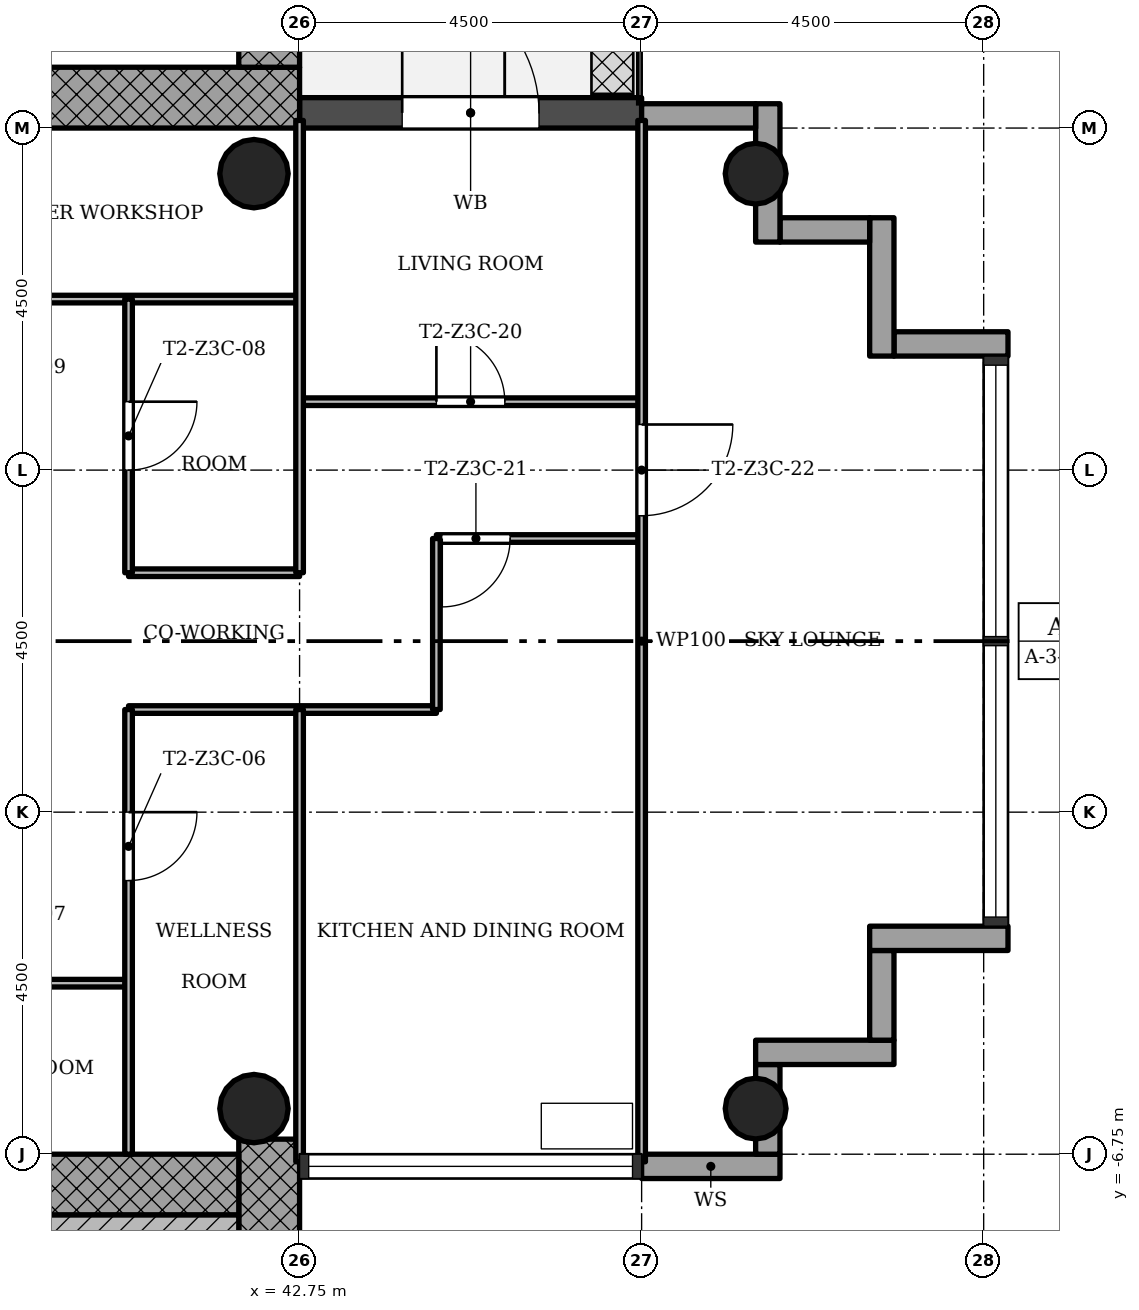
"""IFC4 building model, lengths in metres.
Left out: names, types, materials, properties, quantities, classifications, styles, units other than length and angle.
Written with IfcOpenShell. Run it as: python <this file> out.ifc"""

import sys

from ifc_helpers import new_model, si_unit, direction, frame, frame_2d, origin, origin_2d, place, context, subcontext, project, spatial, rectangle, hollow_circle, extrude, element, fill, save


model = new_model("IFC4")
c1 = context("Model", 3, precision=1e-05, world=origin(), true_north=direction((0.0, 1.0)))
c2 = subcontext(c1, "Body", "Model", "MODEL_VIEW")
j1 = project(units=[si_unit("LENGTHUNIT", "METRE"), si_unit("PLANEANGLEUNIT", "RADIAN")], contexts=[c1])
p1 = place(None, origin())
s1 = spatial("IfcSite", under=j1, at=p1, CompositionType="ELEMENT")
p2 = place(p1, origin())
s2 = spatial("IfcBuilding", under=s1, at=p2, CompositionType="ELEMENT")
p3 = place(p2, frame((0.0, 0.0, 160.9)))
s3 = spatial("IfcBuildingStorey", under=s2, at=p3, CompositionType="ELEMENT", Elevation=160.9)
p4 = place(p3, frame((30.05, 7.15, 0.0), z_axis=(0.0, 0.0, 1.0), x_axis=(1.0, 0.0, 0.0)))
e1 = element("IfcWall", 1, at=p4, inside=s3, PredefinedType="SHEAR", context=c2, shape_type="SweptSolid", body=[
    extrude(rectangle(XDim=12.7, YDim=0.8, at=frame_2d((6.35, 0.0))), origin(), (0.0, 0.0, 1.0), 3.4),
])
p5 = place(p4, frame((5.05, 0.0, 0.0)))
e2 = element("IfcOpeningElement", 2, at=p5, cuts=e1, PredefinedType="OPENING", context=c2, shape_type="SweptSolid", body=[
    extrude(rectangle(XDim=1.8, YDim=2.1, at=frame_2d((0.9, 1.05))), frame((0.0, 0.41, 0.0), z_axis=(0.0, -1.0, 0.0), x_axis=(1.0, 0.0, 0.0)), (0.0, 0.0, 1.0), 0.82),
])
p6 = place(p3, frame((42.35, 7.55, 0.0), z_axis=(0.0, 0.0, 1.0), x_axis=(0.0, 1.0, 0.0)))
e3 = element("IfcWall", 3, at=p6, inside=s3, PredefinedType="SHEAR", context=c2, shape_type="SweptSolid", body=[
    extrude(rectangle(XDim=8.2, YDim=0.8, at=frame_2d((4.1, 0.0))), origin(), (0.0, 0.0, 1.0), 3.4),
])
p7 = place(p3, frame((42.35, -14.95, 0.0), z_axis=(0.0, 0.0, 1.0), x_axis=(0.0, 1.0, 0.0)))
e4 = element("IfcWall", 4, at=p7, inside=s3, PredefinedType="SHEAR", context=c2, shape_type="SweptSolid", body=[
    extrude(rectangle(XDim=8.398, YDim=0.8, at=frame_2d((4.199, 0.0))), origin(), (0.0, 0.0, 1.0), 3.4),
])
p8 = place(p3, frame((41.95, -7.15, 0.0), z_axis=(0.0, 0.0, 1.0), x_axis=(-1.0, 0.0, 0.0)))
e5 = element("IfcWall", 5, at=p8, inside=s3, PredefinedType="SHEAR", context=c2, shape_type="SweptSolid", body=[
    extrude(rectangle(XDim=12.7, YDim=0.8, at=frame_2d((6.35, 0.0))), origin(), (0.0, 0.0, 1.0), 3.4),
])
p9 = place(p8, frame((5.05, 0.0, 0.0)))
e6 = element("IfcOpeningElement", 6, at=p9, cuts=e5, PredefinedType="OPENING", context=c2, shape_type="SweptSolid", body=[
    extrude(rectangle(XDim=1.8, YDim=2.1, at=frame_2d((0.9, 1.05))), frame((0.0, 0.41, 0.0), z_axis=(0.0, -1.0, 0.0), x_axis=(1.0, 0.0, 0.0)), (0.0, 0.0, 1.0), 0.82),
])
for number, where, z_axis, x_axis in (
    (7, (48.75, -6.15, 0.0), (0.0, 0.0, 1.0), (1.0, 0.0, 0.0)),
    (8, (48.75, 6.15, 0.0), (0.0, 0.0, 1.0), (1.0, 0.0, 0.0)),
):
    element("IfcColumn", number, at=place(p3, frame(where, z_axis=z_axis, x_axis=x_axis)), inside=s3, PredefinedType="COLUMN", context=c2, shape_type="SweptSolid", body=[
        extrude(hollow_circle(Radius=0.4, WallThickness=0.028, at=origin_2d()), origin(), (0.0, 0.0, 1.0), 3.4),
    ])
for number, where, z_axis, x_axis in (
    (9, (42.15, -6.15, 0.0), (0.0, 0.0, 1.0), (1.0, 0.0, 0.0)),
    (10, (42.15, 6.15, 0.0), (0.0, 0.0, 1.0), (1.0, 0.0, 0.0)),
):
    element("IfcColumn", number, at=place(p3, frame(where, z_axis=z_axis, x_axis=x_axis)), inside=s3, PredefinedType="COLUMN", context=c2, shape_type="SweptSolid", body=[
        extrude(hollow_circle(Radius=0.45, WallThickness=0.032, at=origin_2d()), origin(), (0.0, 0.0, 1.0), 3.4),
    ])
p10 = place(p3, frame((47.25, -6.91, -0.3), z_axis=(0.0, 0.0, 1.0), x_axis=(1.0, 0.0, 0.0)))
e11 = element("IfcWall", 11, at=p10, inside=s3, PredefinedType="STANDARD", context=c2, shape_type="SweptSolid", body=[
    extrude(rectangle(XDim=1.82, YDim=0.32, at=frame_2d((0.91, 0.0))), origin(), (0.0, 0.0, 1.0), 3.4),
])
p11 = place(p3, frame((48.91, -6.75, -0.3), z_axis=(0.0, 0.0, 1.0), x_axis=(0.0, 1.0, 0.0)))
e12 = element("IfcWall", 12, at=p11, inside=s3, PredefinedType="STANDARD", context=c2, shape_type="SweptSolid", body=[
    extrude(rectangle(XDim=1.18, YDim=0.32, at=frame_2d((0.59, 0.0))), origin(), (0.0, 0.0, 1.0), 3.4),
])
p12 = place(p3, frame((48.75, -5.41, -0.3), z_axis=(0.0, 0.0, 1.0), x_axis=(1.0, 0.0, 0.0)))
e13 = element("IfcWall", 13, at=p12, inside=s3, PredefinedType="STANDARD", context=c2, shape_type="SweptSolid", body=[
    extrude(rectangle(XDim=1.82, YDim=0.32, at=frame_2d((0.91, 0.0))), origin(), (0.0, 0.0, 1.0), 3.4),
])
p13 = place(p3, frame((50.41, -5.25, -0.3), z_axis=(0.0, 0.0, 1.0), x_axis=(0.0, 1.0, 0.0)))
e14 = element("IfcWall", 14, at=p13, inside=s3, PredefinedType="STANDARD", context=c2, shape_type="SweptSolid", body=[
    extrude(rectangle(XDim=1.18, YDim=0.32, at=frame_2d((0.59, 0.0))), origin(), (0.0, 0.0, 1.0), 3.4),
])
p14 = place(p3, frame((50.25, -3.91, -0.3), z_axis=(0.0, 0.0, 1.0), x_axis=(1.0, 0.0, 0.0)))
e15 = element("IfcWall", 15, at=p14, inside=s3, PredefinedType="STANDARD", context=c2, shape_type="SweptSolid", body=[
    extrude(rectangle(XDim=1.82, YDim=0.32, at=frame_2d((0.91, 0.0))), origin(), (0.0, 0.0, 1.0), 3.4),
])
p15 = place(p3, frame((52.07, 3.91, -0.3), z_axis=(0.0, 0.0, 1.0), x_axis=(-1.0, 0.0, 0.0)))
e16 = element("IfcWall", 16, at=p15, inside=s3, PredefinedType="STANDARD", context=c2, shape_type="SweptSolid", body=[
    extrude(rectangle(XDim=1.5, YDim=0.32, at=frame_2d((0.75, 0.0))), origin(), (0.0, 0.0, 1.0), 3.4),
])
p16 = place(p3, frame((50.41, 3.75, -0.3), z_axis=(0.0, 0.0, 1.0), x_axis=(0.0, 1.0, 0.0)))
e17 = element("IfcWall", 17, at=p16, inside=s3, PredefinedType="STANDARD", context=c2, shape_type="SweptSolid", body=[
    extrude(rectangle(XDim=1.82, YDim=0.32, at=frame_2d((0.91, 0.0))), origin(), (0.0, 0.0, 1.0), 3.4),
])
p17 = place(p3, frame((50.25, 5.41, -0.3), z_axis=(0.0, 0.0, 1.0), x_axis=(-1.0, 0.0, 0.0)))
e18 = element("IfcWall", 18, at=p17, inside=s3, PredefinedType="STANDARD", context=c2, shape_type="SweptSolid", body=[
    extrude(rectangle(XDim=1.18, YDim=0.32, at=frame_2d((0.59, 0.0))), origin(), (0.0, 0.0, 1.0), 3.4),
])
p18 = place(p3, frame((48.91, 5.25, -0.3), z_axis=(0.0, 0.0, 1.0), x_axis=(0.0, 1.0, 0.0)))
e19 = element("IfcWall", 19, at=p18, inside=s3, PredefinedType="STANDARD", context=c2, shape_type="SweptSolid", body=[
    extrude(rectangle(XDim=1.82, YDim=0.32, at=frame_2d((0.91, 0.0))), origin(), (0.0, 0.0, 1.0), 3.4),
])
p19 = place(p3, frame((48.75, 6.91, -0.3), z_axis=(0.0, 0.0, 1.0), x_axis=(-1.0, 0.0, 0.0)))
e20 = element("IfcWall", 20, at=p19, inside=s3, PredefinedType="STANDARD", context=c2, shape_type="SweptSolid", body=[
    extrude(rectangle(XDim=1.5, YDim=0.32, at=frame_2d((0.75, 0.0))), origin(), (0.0, 0.0, 1.0), 3.4),
])
p20 = place(p3, frame((47.25, 6.95, -0.02), z_axis=(0.0, 0.0, 1.0), x_axis=(-1.0, 0.0, 0.0)))
e21 = element("IfcWall", 21, at=p20, inside=s3, PredefinedType="STANDARD", context=c2, shape_type="SweptSolid", body=[
    extrude(rectangle(XDim=4.5, YDim=0.4, at=frame_2d((2.25, 0.0))), origin(), (0.0, 0.0, 1.0), 3.12),
])
p21 = place(p20, frame((1.35, 0.0, 0.02)))
e22 = element("IfcOpeningElement", 22, at=p21, cuts=e21, PredefinedType="OPENING", context=c2, shape_type="SweptSolid", body=[
    extrude(rectangle(XDim=1.8, YDim=2.1, at=frame_2d((0.9, 1.05))), frame((0.0, 0.21, 0.0), z_axis=(0.0, -1.0, 0.0), x_axis=(1.0, 0.0, 0.0)), (0.0, 0.0, 1.0), 0.42),
])
p22 = place(p3, frame((40.5, -4.5, 0.0), z_axis=(0.0, 0.0, 1.0), x_axis=(-1.0, 0.0, 0.0)))
e23 = element("IfcWall", 23, at=p22, inside=s3, PredefinedType="PARTITIONING", context=c2, shape_type="SweptSolid", body=[
    extrude(rectangle(XDim=3.0, YDim=0.1, at=frame_2d((1.5, 0.0))), origin(), (0.0, 0.0, 1.0), 3.0),
])
p23 = place(p22, frame((1.05, 0.0, 0.0)))
e24 = element("IfcOpeningElement", 24, at=p23, cuts=e23, PredefinedType="OPENING", context=c2, shape_type="SweptSolid", body=[
    extrude(rectangle(XDim=0.9, YDim=2.1, at=frame_2d((0.45, 1.05))), frame((0.0, 0.06, 0.0), z_axis=(0.0, -1.0, 0.0), x_axis=(1.0, 0.0, 0.0)), (0.0, 0.0, 1.0), 0.12),
])
p24 = place(p3, frame((44.55, -0.9, 0.0), z_axis=(0.0, 0.0, 1.0), x_axis=(-1.0, 0.0, 0.0)))
e25 = element("IfcWall", 25, at=p24, inside=s3, PredefinedType="PARTITIONING", context=c2, shape_type="SweptSolid", body=[
    extrude(rectangle(XDim=4.05, YDim=0.1, at=frame_2d((2.025, 0.0))), origin(), (0.0, 0.0, 1.0), 3.0),
])
p25 = place(p3, frame((42.75, 0.9, 0.0), z_axis=(0.0, 0.0, 1.0), x_axis=(-1.0, 0.0, 0.0)))
e26 = element("IfcWall", 26, at=p25, inside=s3, PredefinedType="PARTITIONING", context=c2, shape_type="SweptSolid", body=[
    extrude(rectangle(XDim=2.25, YDim=0.1, at=frame_2d((1.125, 0.0))), origin(), (0.0, 0.0, 1.0), 3.0),
])
p26 = place(p3, frame((47.25, 1.35, 0.0), z_axis=(0.0, 0.0, 1.0), x_axis=(-1.0, 0.0, 0.0)))
e27 = element("IfcWall", 27, at=p26, inside=s3, PredefinedType="PARTITIONING", context=c2, shape_type="SweptSolid", body=[
    extrude(rectangle(XDim=2.7, YDim=0.1, at=frame_2d((1.35, 0.0))), origin(), (0.0, 0.0, 1.0), 3.0),
])
p27 = place(p26, frame((1.73, 0.0, 0.0)))
e28 = element("IfcOpeningElement", 28, at=p27, cuts=e27, PredefinedType="OPENING", context=c2, shape_type="SweptSolid", body=[
    extrude(rectangle(XDim=0.9, YDim=2.1, at=frame_2d((0.45, 1.05))), frame((0.0, 0.06, 0.0), z_axis=(0.0, -1.0, 0.0), x_axis=(1.0, 0.0, 0.0)), (0.0, 0.0, 1.0), 0.12),
])
p28 = place(p3, frame((47.25, 3.15, 0.0), z_axis=(0.0, 0.0, 1.0), x_axis=(-1.0, 0.0, 0.0)))
e29 = element("IfcWall", 29, at=p28, inside=s3, PredefinedType="PARTITIONING", context=c2, shape_type="SweptSolid", body=[
    extrude(rectangle(XDim=4.5, YDim=0.1, at=frame_2d((2.25, 0.0))), origin(), (0.0, 0.0, 1.0), 3.0),
])
p29 = place(p28, frame((1.8, 0.0, 0.0)))
e30 = element("IfcOpeningElement", 30, at=p29, cuts=e29, PredefinedType="OPENING", context=c2, shape_type="SweptSolid", body=[
    extrude(rectangle(XDim=0.9, YDim=2.1, at=frame_2d((0.45, 1.05))), frame((0.0, 0.06, 0.0), z_axis=(0.0, -1.0, 0.0), x_axis=(1.0, 0.0, 0.0)), (0.0, 0.0, 1.0), 0.12),
])
p30 = place(p3, frame((42.75, 4.5, 0.0), z_axis=(0.0, 0.0, 1.0), x_axis=(-1.0, 0.0, 0.0)))
e31 = element("IfcWall", 31, at=p30, inside=s3, PredefinedType="PARTITIONING", context=c2, shape_type="SweptSolid", body=[
    extrude(rectangle(XDim=5.25, YDim=0.1, at=frame_2d((2.625, 0.0))), origin(), (0.0, 0.0, 1.0), 3.0),
])
p31 = place(p30, frame((3.3, 0.0, 0.0)))
e32 = element("IfcOpeningElement", 32, at=p31, cuts=e31, PredefinedType="OPENING", context=c2, shape_type="SweptSolid", body=[
    extrude(rectangle(XDim=0.9, YDim=2.1, at=frame_2d((0.45, 1.05))), frame((0.0, 0.06, 0.0), z_axis=(0.0, -1.0, 0.0), x_axis=(1.0, 0.0, 0.0)), (0.0, 0.0, 1.0), 0.12),
])
p32 = place(p3, frame((47.25, -6.85, 0.0), z_axis=(0.0, 0.0, 1.0), x_axis=(0.0, 1.0, 0.0)))
e33 = element("IfcWall", 33, at=p32, inside=s3, PredefinedType="PARTITIONING", context=c2, shape_type="SweptSolid", body=[
    extrude(rectangle(XDim=13.7, YDim=0.1, at=frame_2d((6.85, 0.0))), origin(), (0.0, 0.0, 1.0), 3.0),
])
p33 = place(p32, frame((8.5, 0.0, 0.0)))
e34 = element("IfcOpeningElement", 34, at=p33, cuts=e33, PredefinedType="OPENING", context=c2, shape_type="SweptSolid", body=[
    extrude(rectangle(XDim=1.2, YDim=2.1, at=frame_2d((0.6, 1.05))), frame((0.0, 0.06, 0.0), z_axis=(0.0, -1.0, 0.0), x_axis=(1.0, 0.0, 0.0)), (0.0, 0.0, 1.0), 0.12),
])
p34 = place(p3, frame((44.55, -0.9, 0.0), z_axis=(0.0, 0.0, 1.0), x_axis=(0.0, 1.0, 0.0)))
e35 = element("IfcWall", 35, at=p34, inside=s3, PredefinedType="PARTITIONING", context=c2, shape_type="SweptSolid", body=[
    extrude(rectangle(XDim=2.25, YDim=0.1, at=frame_2d((1.125, 0.0))), origin(), (0.0, 0.0, 1.0), 3.0),
])
for number, where, z_axis, x_axis in (
    (36, (42.75, -6.85, 0.0), (0.0, 0.0, 1.0), (0.0, 1.0, 0.0)),
    (37, (42.75, 0.9, 0.0), (0.0, 0.0, 1.0), (0.0, 1.0, 0.0)),
):
    element("IfcWall", number, at=place(p3, frame(where, z_axis=z_axis, x_axis=x_axis)), inside=s3, PredefinedType="PARTITIONING", context=c2, shape_type="SweptSolid", body=[
        extrude(rectangle(XDim=5.95, YDim=0.1, at=frame_2d((2.975, 0.0))), origin(), (0.0, 0.0, 1.0), 3.0),
    ])
p35 = place(p3, frame((40.5, -6.75, 0.0), z_axis=(0.0, 0.0, 1.0), x_axis=(0.0, 1.0, 0.0)))
e38 = element("IfcWall", 38, at=p35, inside=s3, PredefinedType="PARTITIONING", context=c2, shape_type="SweptSolid", body=[
    extrude(rectangle(XDim=5.85, YDim=0.1, at=frame_2d((2.925, 0.0))), origin(), (0.0, 0.0, 1.0), 3.0),
])
p36 = place(p35, frame((3.6, 0.0, 0.0)))
e39 = element("IfcOpeningElement", 39, at=p36, cuts=e38, PredefinedType="OPENING", context=c2, shape_type="SweptSolid", body=[
    extrude(rectangle(XDim=0.9, YDim=2.1, at=frame_2d((0.45, 1.05))), frame((0.0, 0.06, 0.0), z_axis=(0.0, -1.0, 0.0), x_axis=(1.0, 0.0, 0.0)), (0.0, 0.0, 1.0), 0.12),
])
p37 = place(p3, frame((40.5, 0.9, 0.0), z_axis=(0.0, 0.0, 1.0), x_axis=(0.0, 1.0, 0.0)))
e40 = element("IfcWall", 40, at=p37, inside=s3, PredefinedType="PARTITIONING", context=c2, shape_type="SweptSolid", body=[
    extrude(rectangle(XDim=3.6, YDim=0.1, at=frame_2d((1.8, 0.0))), origin(), (0.0, 0.0, 1.0), 3.0),
])
p38 = place(p37, frame((1.35, 0.0, 0.0)))
e41 = element("IfcOpeningElement", 41, at=p38, cuts=e40, PredefinedType="OPENING", context=c2, shape_type="SweptSolid", body=[
    extrude(rectangle(XDim=0.9, YDim=2.1, at=frame_2d((0.45, 1.05))), frame((0.0, 0.06, 0.0), z_axis=(0.0, -1.0, 0.0), x_axis=(1.0, 0.0, 0.0)), (0.0, 0.0, 1.0), 0.12),
])
p39 = place(p3, frame((37.85, -7.75, 0.0), z_axis=(0.0, 0.0, 1.0), x_axis=(1.0, 0.0, 0.0)))
e42 = element("IfcWall", 42, at=p39, inside=s3, PredefinedType="SHEAR", context=c2, shape_type="SweptSolid", body=[
    extrude(rectangle(XDim=4.1, YDim=0.4, at=frame_2d((2.05, 0.0))), origin(), (0.0, 0.0, 1.0), 3.4),
])
p40 = place(p21, origin())
e43 = element("IfcDoor", 43, at=p40, inside=s3, OperationType="SINGLE_SWING_RIGHT", PredefinedType="DOOR", context=c2, shape_type="SweptSolid", body=[
    extrude(rectangle(XDim=1.8, YDim=2.1, at=frame_2d((0.9, 1.05))), frame((0.0, 0.025, 0.0), z_axis=(0.0, -1.0, 0.0), x_axis=(1.0, 0.0, 0.0)), (0.0, 0.0, 1.0), 0.05),
])
fill(e22, e43)
p41 = place(p36, origin())
e44 = element("IfcDoor", 44, at=p41, inside=s3, OperationType="SINGLE_SWING_RIGHT", PredefinedType="DOOR", context=c2, shape_type="SweptSolid", body=[
    extrude(rectangle(XDim=0.9, YDim=2.1, at=frame_2d((0.45, 1.05))), frame((0.0, 0.025, 0.0), z_axis=(0.0, -1.0, 0.0), x_axis=(1.0, 0.0, 0.0)), (0.0, 0.0, 1.0), 0.05),
])
fill(e39, e44)
p42 = place(p38, origin())
e45 = element("IfcDoor", 45, at=p42, inside=s3, OperationType="SINGLE_SWING_RIGHT", PredefinedType="DOOR", context=c2, shape_type="SweptSolid", body=[
    extrude(rectangle(XDim=0.9, YDim=2.1, at=frame_2d((0.45, 1.05))), frame((0.0, 0.025, 0.0), z_axis=(0.0, -1.0, 0.0), x_axis=(1.0, 0.0, 0.0)), (0.0, 0.0, 1.0), 0.05),
])
fill(e41, e45)
p43 = place(p29, origin())
e46 = element("IfcDoor", 46, at=p43, inside=s3, OperationType="SINGLE_SWING_RIGHT", PredefinedType="DOOR", context=c2, shape_type="SweptSolid", body=[
    extrude(rectangle(XDim=0.9, YDim=2.1, at=frame_2d((0.45, 1.05))), frame((0.0, 0.025, 0.0), z_axis=(0.0, -1.0, 0.0), x_axis=(1.0, 0.0, 0.0)), (0.0, 0.0, 1.0), 0.05),
])
fill(e30, e46)
p44 = place(p27, origin())
e47 = element("IfcDoor", 47, at=p44, inside=s3, OperationType="SINGLE_SWING_LEFT", PredefinedType="DOOR", context=c2, shape_type="SweptSolid", body=[
    extrude(rectangle(XDim=0.9, YDim=2.1, at=frame_2d((0.45, 1.05))), frame((0.0, 0.025, 0.0), z_axis=(0.0, -1.0, 0.0), x_axis=(1.0, 0.0, 0.0)), (0.0, 0.0, 1.0), 0.05),
])
fill(e28, e47)
p45 = place(p33, origin())
e48 = element("IfcDoor", 48, at=p45, inside=s3, OperationType="SINGLE_SWING_RIGHT", PredefinedType="DOOR", context=c2, shape_type="SweptSolid", body=[
    extrude(rectangle(XDim=1.2, YDim=2.1, at=frame_2d((0.6, 1.05))), frame((0.0, 0.025, 0.0), z_axis=(0.0, -1.0, 0.0), x_axis=(1.0, 0.0, 0.0)), (0.0, 0.0, 1.0), 0.05),
])
fill(e34, e48)
save(model, sys.argv[1])
